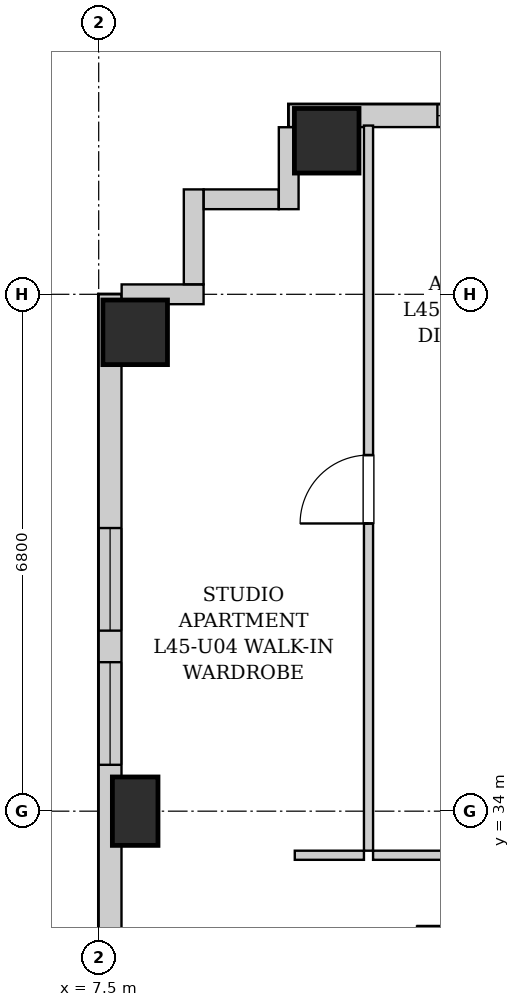
"""IFC4 building model, lengths in metres.
Left out: names, types, materials, properties, quantities, classifications, styles, units other than length and angle.
Written with IfcOpenShell. Run it as: python <this file> out.ifc"""

import sys

from ifc_helpers import new_model, si_unit, direction, frame, frame_2d, origin, origin_2d, place, context, subcontext, project, spatial, rectangle, extrude, element, fill, save


model = new_model("IFC4")
c1 = context("Model", 3, precision=1e-05, world=origin(), true_north=direction((0.0, 1.0)))
c2 = subcontext(c1, "Body", "Model", "MODEL_VIEW")
j1 = project(units=[si_unit("LENGTHUNIT", "METRE"), si_unit("PLANEANGLEUNIT", "RADIAN")], contexts=[c1])
p1 = place(None, origin())
s1 = spatial("IfcSite", under=j1, at=p1, CompositionType="ELEMENT")
p2 = place(p1, origin())
s2 = spatial("IfcBuilding", under=s1, at=p2, CompositionType="ELEMENT")
p3 = place(p2, frame((0.0, 0.0, 156.9)))
s3 = spatial("IfcBuildingStorey", under=s2, at=p3, CompositionType="ELEMENT", Elevation=156.9)
p4 = place(p3, frame((10.5, 42.82, 0.0), z_axis=(0.0, 0.0, 1.0), x_axis=(1.0, 0.0, 0.0)))
e1 = element("IfcColumn", 1, at=p4, inside=s3, PredefinedType="COLUMN", context=c2, shape_type="SweptSolid", body=[
    extrude(rectangle(XDim=0.85, YDim=0.85, at=origin_2d()), origin(), (0.0, 0.0, 1.0), 3.25),
])
p5 = place(p3, frame((7.98, 34.0, 0.0), z_axis=(0.0, 0.0, 1.0), x_axis=(1.0, 0.0, 0.0)))
e2 = element("IfcColumn", 2, at=p5, inside=s3, PredefinedType="COLUMN", context=c2, shape_type="SweptSolid", body=[
    extrude(rectangle(XDim=0.6, YDim=0.9, at=origin_2d()), origin(), (0.0, 0.0, 1.0), 3.25),
])
p6 = place(p3, frame((7.98, 40.3, 0.0), z_axis=(0.0, 0.0, 1.0), x_axis=(1.0, 0.0, 0.0)))
e3 = element("IfcColumn", 3, at=p6, inside=s3, PredefinedType="COLUMN", context=c2, shape_type="SweptSolid", body=[
    extrude(rectangle(XDim=0.85, YDim=0.85, at=origin_2d()), origin(), (0.0, 0.0, 1.0), 3.25),
])
p7 = place(p3, frame((10.0, 43.15, 0.0), z_axis=(0.0, 0.0, 1.0), x_axis=(1.0, 0.0, 0.0)))
e4 = element("IfcWall", 4, at=p7, inside=s3, PredefinedType="SOLIDWALL", context=c2, shape_type="SweptSolid", body=[
    extrude(rectangle(XDim=21.35, YDim=0.3, at=frame_2d((10.675, 0.0))), origin(), (0.0, 0.0, 1.0), 2.99),
])
p8 = place(p7, frame((1.956, 0.0, 0.55)))
e5 = element("IfcOpeningElement", 5, at=p8, cuts=e4, PredefinedType="OPENING", context=c2, shape_type="SweptSolid", body=[
    extrude(rectangle(XDim=1.35, YDim=1.2, at=frame_2d((0.675, 0.6))), frame((0.0, 0.16, 0.0), z_axis=(0.0, -1.0, 0.0), x_axis=(1.0, 0.0, 0.0)), (0.0, 0.0, 1.0), 0.32),
])
p9 = place(p7, frame((5.189, 0.0, 0.55)))
e6 = element("IfcOpeningElement", 6, at=p9, cuts=e4, PredefinedType="OPENING", context=c2, shape_type="SweptSolid", body=[
    extrude(rectangle(XDim=1.35, YDim=1.2, at=frame_2d((0.675, 0.6))), frame((0.0, 0.16, 0.0), z_axis=(0.0, -1.0, 0.0), x_axis=(1.0, 0.0, 0.0)), (0.0, 0.0, 1.0), 0.32),
])
p10 = place(p7, frame((8.421, 0.0, 0.55)))
e7 = element("IfcOpeningElement", 7, at=p10, cuts=e4, PredefinedType="OPENING", context=c2, shape_type="SweptSolid", body=[
    extrude(rectangle(XDim=1.35, YDim=1.2, at=frame_2d((0.675, 0.6))), frame((0.0, 0.16, 0.0), z_axis=(0.0, -1.0, 0.0), x_axis=(1.0, 0.0, 0.0)), (0.0, 0.0, 1.0), 0.32),
])
p11 = place(p7, frame((11.15, 0.0, 0.55)))
e8 = element("IfcOpeningElement", 8, at=p11, cuts=e4, PredefinedType="OPENING", context=c2, shape_type="SweptSolid", body=[
    extrude(rectangle(XDim=1.35, YDim=1.2, at=frame_2d((0.675, 0.6))), frame((0.0, 0.16, 0.0), z_axis=(0.0, -1.0, 0.0), x_axis=(1.0, 0.0, 0.0)), (0.0, 0.0, 1.0), 0.32),
])
p12 = place(p7, frame((18.044, 0.0, 0.55)))
e9 = element("IfcOpeningElement", 9, at=p12, cuts=e4, PredefinedType="OPENING", context=c2, shape_type="SweptSolid", body=[
    extrude(rectangle(XDim=1.35, YDim=1.2, at=frame_2d((0.675, 0.6))), frame((0.0, 0.16, 0.0), z_axis=(0.0, -1.0, 0.0), x_axis=(1.0, 0.0, 0.0)), (0.0, 0.0, 1.0), 0.32),
])
p13 = place(p3, frame((7.65, 6.3, 0.0), z_axis=(0.0, 0.0, 1.0), x_axis=(0.0, 1.0, 0.0)))
e10 = element("IfcWall", 10, at=p13, inside=s3, PredefinedType="SOLIDWALL", context=c2, shape_type="SweptSolid", body=[
    extrude(rectangle(XDim=34.5, YDim=0.3, at=frame_2d((17.25, 0.0))), origin(), (0.0, 0.0, 1.0), 2.99),
])
p14 = place(p13, frame((30.075, 0.0, 0.55)))
e11 = element("IfcOpeningElement", 11, at=p14, cuts=e10, PredefinedType="OPENING", context=c2, shape_type="SweptSolid", body=[
    extrude(rectangle(XDim=1.35, YDim=1.2, at=frame_2d((0.675, 0.6))), frame((0.0, 0.16, 0.0), z_axis=(0.0, -1.0, 0.0), x_axis=(1.0, 0.0, 0.0)), (0.0, 0.0, 1.0), 0.32),
])
p15 = place(p13, frame((28.31, 0.0, 0.55)))
e12 = element("IfcOpeningElement", 12, at=p15, cuts=e10, PredefinedType="OPENING", context=c2, shape_type="SweptSolid", body=[
    extrude(rectangle(XDim=1.35, YDim=1.2, at=frame_2d((0.675, 0.6))), frame((0.0, 0.16, 0.0), z_axis=(0.0, -1.0, 0.0), x_axis=(1.0, 0.0, 0.0)), (0.0, 0.0, 1.0), 0.32),
])
p16 = place(p13, frame((10.35, 0.0, 0.55)))
e13 = element("IfcOpeningElement", 13, at=p16, cuts=e10, PredefinedType="OPENING", context=c2, shape_type="SweptSolid", body=[
    extrude(rectangle(XDim=1.35, YDim=1.2, at=frame_2d((0.675, 0.6))), frame((0.0, 0.16, 0.0), z_axis=(0.0, -1.0, 0.0), x_axis=(1.0, 0.0, 0.0)), (0.0, 0.0, 1.0), 0.32),
])
p17 = place(p13, frame((19.725, 0.0, 0.55)))
e14 = element("IfcOpeningElement", 14, at=p17, cuts=e10, PredefinedType="OPENING", context=c2, shape_type="SweptSolid", body=[
    extrude(rectangle(XDim=1.35, YDim=1.2, at=frame_2d((0.675, 0.6))), frame((0.0, 0.16, 0.0), z_axis=(0.0, -1.0, 0.0), x_axis=(1.0, 0.0, 0.0)), (0.0, 0.0, 1.0), 0.32),
])
p18 = place(p3, frame((7.802, 40.8, 0.0), z_axis=(0.0, 0.0, 1.0), x_axis=(1.0, 0.0, 0.0)))
e15 = element("IfcWall", 15, at=p18, inside=s3, PredefinedType="SOLIDWALL", context=c2, shape_type="SweptSolid", body=[
    extrude(rectangle(XDim=1.078, YDim=0.26, at=frame_2d((0.539, 0.0))), origin(), (0.0, 0.0, 1.0), 2.99),
])
p19 = place(p3, frame((8.75, 40.932, 0.0), z_axis=(0.0, 0.0, 1.0), x_axis=(0.0, 1.0, 0.0)))
e16 = element("IfcWall", 16, at=p19, inside=s3, PredefinedType="SOLIDWALL", context=c2, shape_type="SweptSolid", body=[
    extrude(rectangle(XDim=1.248, YDim=0.26, at=frame_2d((0.624, 0.0))), origin(), (0.0, 0.0, 1.0), 2.99),
])
p20 = place(p3, frame((8.882, 42.05, 0.0), z_axis=(0.0, 0.0, 1.0), x_axis=(1.0, 0.0, 0.0)))
e17 = element("IfcWall", 17, at=p20, inside=s3, PredefinedType="SOLIDWALL", context=c2, shape_type="SweptSolid", body=[
    extrude(rectangle(XDim=0.986, YDim=0.26, at=frame_2d((0.493, 0.0))), origin(), (0.0, 0.0, 1.0), 2.99),
])
p21 = place(p3, frame((10.0, 41.92, 0.0), z_axis=(0.0, 0.0, 1.0), x_axis=(0.0, 1.0, 0.0)))
e18 = element("IfcWall", 18, at=p21, inside=s3, PredefinedType="SOLIDWALL", context=c2, shape_type="SweptSolid", body=[
    extrude(rectangle(XDim=1.078, YDim=0.26, at=frame_2d((0.539, 0.0))), origin(), (0.0, 0.0, 1.0), 2.99),
])
p22 = place(p3, frame((10.08, 33.42, 0.0), z_axis=(0.0, 0.0, 1.0), x_axis=(1.0, 0.0, 0.0)))
e19 = element("IfcWall", 19, at=p22, inside=s3, PredefinedType="PARTITIONING", context=c2, shape_type="SweptSolid", body=[
    extrude(rectangle(XDim=0.91, YDim=0.12, at=frame_2d((0.455, 0.0))), origin(), (0.0, 0.0, 1.0), 2.99),
])
p23 = place(p3, frame((11.11, 33.42, 0.0), z_axis=(0.0, 0.0, 1.0), x_axis=(1.0, 0.0, 0.0)))
e20 = element("IfcWall", 20, at=p23, inside=s3, PredefinedType="PARTITIONING", context=c2, shape_type="SweptSolid", body=[
    extrude(rectangle(XDim=1.37, YDim=0.12, at=frame_2d((0.685, 0.0))), origin(), (0.0, 0.0, 1.0), 2.99),
])
p24 = place(p3, frame((11.05, 33.48, 0.0), z_axis=(0.0, 0.0, 1.0), x_axis=(0.0, 1.0, 0.0)))
e21 = element("IfcWall", 21, at=p24, inside=s3, PredefinedType="PARTITIONING", context=c2, shape_type="SweptSolid", body=[
    extrude(rectangle(XDim=9.54, YDim=0.12, at=frame_2d((4.77, 0.0))), origin(), (0.0, 0.0, 1.0), 2.99),
])
p25 = place(p24, frame((4.305, 0.0, 0.0)))
e22 = element("IfcOpeningElement", 22, at=p25, cuts=e21, PredefinedType="OPENING", context=c2, shape_type="SweptSolid", body=[
    extrude(rectangle(XDim=0.9, YDim=2.05, at=frame_2d((0.45, 1.025))), frame((0.0, 0.07, 0.0), z_axis=(0.0, -1.0, 0.0), x_axis=(1.0, 0.0, 0.0)), (0.0, 0.0, 1.0), 0.14),
])
p26 = place(p25, origin())
e23 = element("IfcDoor", 23, at=p26, inside=s3, OperationType="SINGLE_SWING_LEFT", PredefinedType="DOOR", context=c2, shape_type="SweptSolid", body=[
    extrude(rectangle(XDim=0.9, YDim=2.05, at=frame_2d((0.45, 1.025))), frame((0.0, 0.025, 0.0), z_axis=(0.0, -1.0, 0.0), x_axis=(1.0, 0.0, 0.0)), (0.0, 0.0, 1.0), 0.05),
])
fill(e22, e23)
p27 = place(p14, origin())
e24 = element("IfcWindow", 24, at=p27, inside=s3, PartitioningType="SINGLE_PANEL", PredefinedType="WINDOW", context=c2, shape_type="SweptSolid", body=[
    extrude(rectangle(XDim=1.35, YDim=1.2, at=frame_2d((0.675, 0.6))), frame((0.0, 0.03, 0.0), z_axis=(0.0, -1.0, 0.0), x_axis=(1.0, 0.0, 0.0)), (0.0, 0.0, 1.0), 0.06),
])
fill(e11, e24)
p28 = place(p15, origin())
e25 = element("IfcWindow", 25, at=p28, inside=s3, PartitioningType="SINGLE_PANEL", PredefinedType="WINDOW", context=c2, shape_type="SweptSolid", body=[
    extrude(rectangle(XDim=1.35, YDim=1.2, at=frame_2d((0.675, 0.6))), frame((0.0, 0.03, 0.0), z_axis=(0.0, -1.0, 0.0), x_axis=(1.0, 0.0, 0.0)), (0.0, 0.0, 1.0), 0.06),
])
fill(e12, e25)
p29 = place(p8, origin())
e26 = element("IfcWindow", 26, at=p29, inside=s3, PartitioningType="SINGLE_PANEL", PredefinedType="WINDOW", context=c2, shape_type="SweptSolid", body=[
    extrude(rectangle(XDim=1.35, YDim=1.2, at=frame_2d((0.675, 0.6))), frame((0.0, 0.03, 0.0), z_axis=(0.0, -1.0, 0.0), x_axis=(1.0, 0.0, 0.0)), (0.0, 0.0, 1.0), 0.06),
])
fill(e5, e26)
save(model, sys.argv[1])
